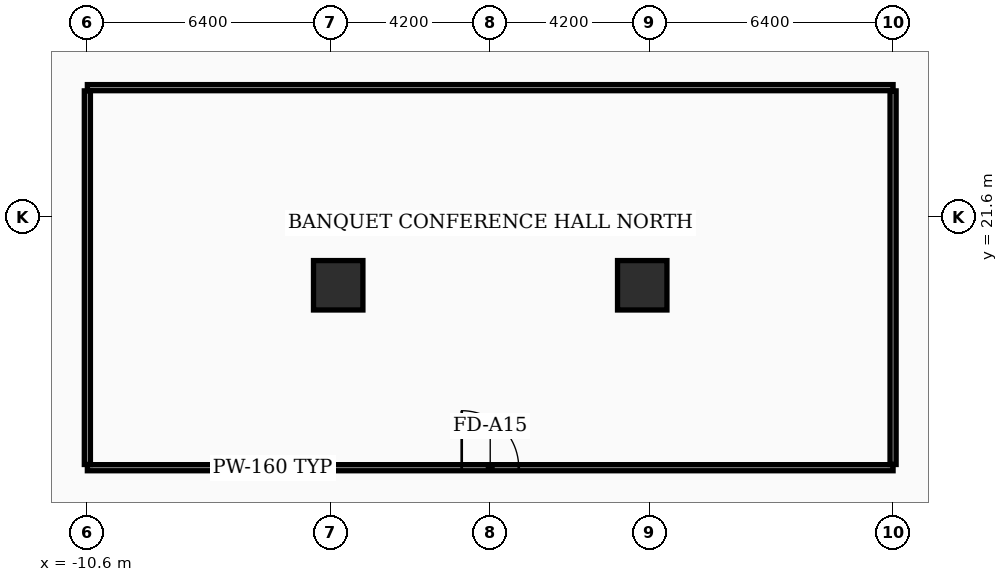
"""IFC4 building model, lengths in metres.
Left out: names, types, materials, properties, quantities, classifications, styles, units other than length and angle.
Written with IfcOpenShell. Run it as: python <this file> out.ifc"""

import sys

from ifc_helpers import new_model, si_unit, direction, frame, frame_2d, origin, origin_2d, place, context, subcontext, project, spatial, rectangle, extrude, element, fill, save


model = new_model("IFC4")
c1 = context("Model", 3, precision=1e-05, world=origin(), true_north=direction((0.0, 1.0)))
c2 = subcontext(c1, "Body", "Model", "MODEL_VIEW")
j1 = project(units=[si_unit("LENGTHUNIT", "METRE"), si_unit("PLANEANGLEUNIT", "RADIAN")], contexts=[c1])
p1 = place(None, origin())
s1 = spatial("IfcSite", under=j1, at=p1, CompositionType="ELEMENT")
p2 = place(p1, origin())
s2 = spatial("IfcBuilding", under=s1, at=p2, CompositionType="ELEMENT")
p3 = place(p2, frame((0.0, 0.0, 5.4)))
s3 = spatial("IfcBuildingStorey", under=s2, at=p3, CompositionType="ELEMENT", Elevation=5.4)
for number, where, z_axis, x_axis in (
    (1, (-4.0, 19.8, 0.0), (0.0, 0.0, 1.0), (1.0, 0.0, 0.0)),
    (2, (4.0, 19.8, 0.0), (0.0, 0.0, 1.0), (1.0, 0.0, 0.0)),
):
    element("IfcColumn", number, at=place(p3, frame(where, z_axis=z_axis, x_axis=x_axis)), inside=s3, PredefinedType="COLUMN", context=c2, shape_type="SweptSolid", body=[
        extrude(rectangle(XDim=1.3, YDim=1.3, at=origin_2d()), origin(), (0.0, 0.0, 1.0), 4.8),
    ])
p4 = place(p3, frame((-10.6, 15.0, 0.0), z_axis=(0.0, 0.0, 1.0), x_axis=(1.0, 0.0, 0.0)))
e3 = element("IfcWall", 3, at=p4, inside=s3, PredefinedType="PARTITIONING", context=c2, shape_type="SweptSolid", body=[
    extrude(rectangle(XDim=21.2, YDim=0.16, at=frame_2d((10.6, 0.0))), origin(), (0.0, 0.0, 1.0), 3.62),
])
p5 = place(p4, frame((9.85, 0.0, 0.0)))
e4 = element("IfcOpeningElement", 4, at=p5, cuts=e3, PredefinedType="OPENING", context=c2, shape_type="SweptSolid", body=[
    extrude(rectangle(XDim=1.5, YDim=2.15, at=frame_2d((0.75, 1.075))), frame((0.0, 0.09, 0.0), z_axis=(0.0, -1.0, 0.0), x_axis=(1.0, 0.0, 0.0)), (0.0, 0.0, 1.0), 0.18),
])
p6 = place(p3, frame((-10.6, 25.0, 0.0), z_axis=(0.0, 0.0, 1.0), x_axis=(1.0, 0.0, 0.0)))
e5 = element("IfcWall", 5, at=p6, inside=s3, PredefinedType="PARTITIONING", context=c2, shape_type="SweptSolid", body=[
    extrude(rectangle(XDim=21.2, YDim=0.16, at=frame_2d((10.6, 0.0))), origin(), (0.0, 0.0, 1.0), 3.62),
])
for number, where, z_axis, x_axis in (
    (6, (-10.6, 15.085, 0.0), (0.0, 0.0, 1.0), (0.0, 1.0, 0.0)),
    (7, (10.6, 15.085, 0.0), (0.0, 0.0, 1.0), (0.0, 1.0, 0.0)),
):
    element("IfcWall", number, at=place(p3, frame(where, z_axis=z_axis, x_axis=x_axis)), inside=s3, PredefinedType="PARTITIONING", context=c2, shape_type="SweptSolid", body=[
        extrude(rectangle(XDim=9.83, YDim=0.16, at=frame_2d((4.915, 0.0))), origin(), (0.0, 0.0, 1.0), 3.62),
    ])
p7 = place(p5, origin())
e8 = element("IfcDoor", 8, at=p7, inside=s3, OperationType="DOUBLE_DOOR_SINGLE_SWING", PredefinedType="DOOR", context=c2, shape_type="SweptSolid", body=[
    extrude(rectangle(XDim=1.5, YDim=2.15, at=frame_2d((0.75, 1.075))), frame((0.0, 0.025, 0.0), z_axis=(0.0, -1.0, 0.0), x_axis=(1.0, 0.0, 0.0)), (0.0, 0.0, 1.0), 0.05),
])
fill(e4, e8)
save(model, sys.argv[1])
